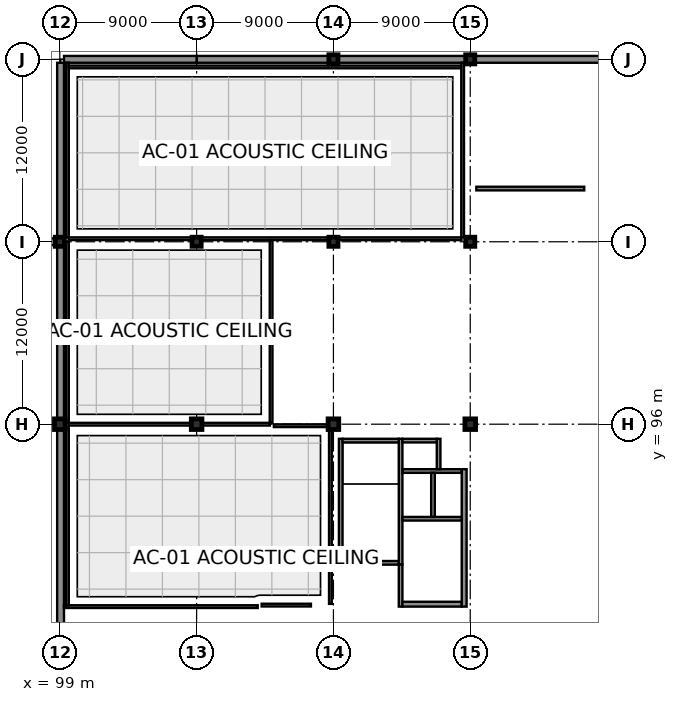
"""IFC4 building model, lengths in metres.
Left out: names, types, materials, properties, quantities, classifications, styles, units other than length and angle.
Written with IfcOpenShell. Run it as: python <this file> out.ifc"""

import sys

from ifc_helpers import new_model, si_unit, direction, frame, frame_2d, origin, origin_2d, place, context, subcontext, project, spatial, rectangle, extrude, element, fill, save


model = new_model("IFC4")
c1 = context("Model", 3, precision=1e-05, world=origin(), true_north=direction((0.0, 1.0)))
c2 = subcontext(c1, "Body", "Model", "MODEL_VIEW")
j1 = project(units=[si_unit("LENGTHUNIT", "METRE"), si_unit("PLANEANGLEUNIT", "RADIAN")], contexts=[c1])
p1 = place(None, origin())
s1 = spatial("IfcSite", under=j1, at=p1, CompositionType="ELEMENT")
p2 = place(p1, origin())
s2 = spatial("IfcBuilding", under=s1, at=p2, CompositionType="ELEMENT")
p3 = place(p2, frame((0.0, 0.0, -4.5)))
s3 = spatial("IfcBuildingStorey", under=s2, at=p3, CompositionType="ELEMENT", Elevation=-4.5)
p4 = place(p3, frame((99.0, 96.0, 0.0), z_axis=(0.0, 0.0, 1.0), x_axis=(1.0, 0.0, 0.0)))
e1 = element("IfcColumn", 1, at=p4, inside=s3, PredefinedType="COLUMN", context=c2, shape_type="SweptSolid", body=[
    extrude(rectangle(XDim=0.7, YDim=0.7, at=origin_2d()), origin(), (0.0, 0.0, 1.0), 4.5),
])
p5 = place(p3, frame((99.0, 108.0, 0.0), z_axis=(0.0, 0.0, 1.0), x_axis=(1.0, 0.0, 0.0)))
e2 = element("IfcColumn", 2, at=p5, inside=s3, PredefinedType="COLUMN", context=c2, shape_type="SweptSolid", body=[
    extrude(rectangle(XDim=0.6, YDim=0.6, at=origin_2d()), origin(), (0.0, 0.0, 1.0), 4.5),
])
p6 = place(p3, frame((108.0, 96.0, 0.0), z_axis=(0.0, 0.0, 1.0), x_axis=(1.0, 0.0, 0.0)))
e3 = element("IfcColumn", 3, at=p6, inside=s3, PredefinedType="COLUMN", context=c2, shape_type="SweptSolid", body=[
    extrude(rectangle(XDim=0.7, YDim=0.7, at=origin_2d()), origin(), (0.0, 0.0, 1.0), 4.5),
])
p7 = place(p3, frame((108.0, 108.0, 0.0), z_axis=(0.0, 0.0, 1.0), x_axis=(1.0, 0.0, 0.0)))
e4 = element("IfcColumn", 4, at=p7, inside=s3, PredefinedType="COLUMN", context=c2, shape_type="SweptSolid", body=[
    extrude(rectangle(XDim=0.6, YDim=0.6, at=origin_2d()), origin(), (0.0, 0.0, 1.0), 4.5),
])
p8 = place(p3, frame((117.0, 96.0, 0.0), z_axis=(0.0, 0.0, 1.0), x_axis=(1.0, 0.0, 0.0)))
e5 = element("IfcColumn", 5, at=p8, inside=s3, PredefinedType="COLUMN", context=c2, shape_type="SweptSolid", body=[
    extrude(rectangle(XDim=0.7, YDim=0.7, at=origin_2d()), origin(), (0.0, 0.0, 1.0), 4.5),
])
for number, where, z_axis, x_axis in (
    (6, (117.0, 108.0, 0.0), (0.0, 0.0, 1.0), (1.0, 0.0, 0.0)),
    (7, (117.0, 120.0, 0.0), (0.0, 0.0, 1.0), (1.0, 0.0, 0.0)),
):
    element("IfcColumn", number, at=place(p3, frame(where, z_axis=z_axis, x_axis=x_axis)), inside=s3, PredefinedType="COLUMN", context=c2, shape_type="SweptSolid", body=[
        extrude(rectangle(XDim=0.6, YDim=0.6, at=origin_2d()), origin(), (0.0, 0.0, 1.0), 4.5),
    ])
p9 = place(p3, frame((126.0, 96.0, 0.0), z_axis=(0.0, 0.0, 1.0), x_axis=(1.0, 0.0, 0.0)))
e8 = element("IfcColumn", 8, at=p9, inside=s3, PredefinedType="COLUMN", context=c2, shape_type="SweptSolid", body=[
    extrude(rectangle(XDim=0.7, YDim=0.7, at=origin_2d()), origin(), (0.0, 0.0, 1.0), 4.5),
])
for number, where, z_axis, x_axis in (
    (9, (126.0, 108.0, 0.0), (0.0, 0.0, 1.0), (1.0, 0.0, 0.0)),
    (10, (126.0, 120.0, 0.0), (0.0, 0.0, 1.0), (1.0, 0.0, 0.0)),
):
    element("IfcColumn", number, at=place(p3, frame(where, z_axis=z_axis, x_axis=x_axis)), inside=s3, PredefinedType="COLUMN", context=c2, shape_type="SweptSolid", body=[
        extrude(rectangle(XDim=0.6, YDim=0.6, at=origin_2d()), origin(), (0.0, 0.0, 1.0), 4.5),
    ])
for number, where, z_axis, x_axis in (
    (11, (134.704, 120.0, 0.0), (0.0, 0.0, 1.0), (-1.0, 0.0, 0.0)),
    (12, (125.704, 120.0, 0.0), (0.0, 0.0, 1.0), (-1.0, 0.0, 0.0)),
):
    element("IfcWall", number, at=place(p3, frame(where, z_axis=z_axis, x_axis=x_axis)), inside=s3, PredefinedType="USERDEFINED", context=c2, shape_type="SweptSolid", body=[
        extrude(rectangle(XDim=8.408, YDim=0.45, at=frame_2d((4.204, 0.0))), origin(), (0.0, 0.0, 1.0), 4.32),
    ])
p10 = place(p3, frame((116.704, 120.0, 0.0), z_axis=(0.0, 0.0, 1.0), x_axis=(-1.0, 0.0, 0.0)))
e13 = element("IfcWall", 13, at=p10, inside=s3, PredefinedType="USERDEFINED", context=c2, shape_type="SweptSolid", body=[
    extrude(rectangle(XDim=8.704, YDim=0.45, at=frame_2d((4.352, 0.0))), origin(), (0.0, 0.0, 1.0), 4.32),
])
p11 = place(p3, frame((108.0, 120.0, 0.0), z_axis=(0.0, 0.0, 1.0), x_axis=(-1.0, 0.0, 0.0)))
e14 = element("IfcWall", 14, at=p11, inside=s3, PredefinedType="USERDEFINED", context=c2, shape_type="SweptSolid", body=[
    extrude(rectangle(XDim=8.725, YDim=0.45, at=frame_2d((4.362, 0.0))), origin(), (0.0, 0.0, 1.0), 4.32),
])
p12 = place(p3, frame((99.05, 119.775, 0.0), z_axis=(0.0, 0.0, 1.0), x_axis=(0.0, -1.0, 0.0)))
e15 = element("IfcWall", 15, at=p12, inside=s3, PredefinedType="USERDEFINED", context=c2, shape_type="SweptSolid", body=[
    extrude(rectangle(XDim=11.479, YDim=0.45, at=frame_2d((5.74, 0.0))), origin(), (0.0, 0.0, 1.0), 4.32),
])
p13 = place(p3, frame((99.05, 107.704, 0.0), z_axis=(0.0, 0.0, 1.0), x_axis=(0.0, -1.0, 0.0)))
e16 = element("IfcWall", 16, at=p13, inside=s3, PredefinedType="USERDEFINED", context=c2, shape_type="SweptSolid", body=[
    extrude(rectangle(XDim=11.358, YDim=0.45, at=frame_2d((5.679, 0.0))), origin(), (0.0, 0.0, 1.0), 4.32),
])
p14 = place(p3, frame((99.05, 95.654, 0.0), z_axis=(0.0, 0.0, 1.0), x_axis=(0.0, -1.0, 0.0)))
e17 = element("IfcWall", 17, at=p14, inside=s3, PredefinedType="USERDEFINED", context=c2, shape_type="SweptSolid", body=[
    extrude(rectangle(XDim=17.308, YDim=0.45, at=frame_2d((8.654, 0.0))), origin(), (0.0, 0.0, 1.0), 4.32),
])
p15 = place(p3, frame((98.654, 108.0, 0.0), z_axis=(0.0, 0.0, 1.0), x_axis=(-1.0, 0.0, 0.0)))
e18 = element("IfcWall", 18, at=p15, inside=s3, PredefinedType="USERDEFINED", context=c2, shape_type="SweptSolid", body=[
    extrude(rectangle(XDim=8.358, YDim=0.45, at=frame_2d((4.179, 0.0))), origin(), (0.0, 0.0, 1.0), 4.32),
])
p16 = place(p3, frame((117.48, 86.76, 0.0), z_axis=(0.0, 0.0, 1.0), x_axis=(0.0, 1.0, 0.0)))
e19 = element("IfcWall", 19, at=p16, inside=s3, PredefinedType="SHEAR", context=c2, shape_type="SweptSolid", body=[
    extrude(rectangle(XDim=8.28, YDim=0.24, at=frame_2d((4.14, 0.0))), origin(), (0.0, 0.0, 1.0), 4.31),
])
p17 = place(p3, frame((121.42, 86.76, 0.0), z_axis=(0.0, 0.0, 1.0), x_axis=(0.0, 1.0, 0.0)))
e20 = element("IfcWall", 20, at=p17, inside=s3, PredefinedType="SHEAR", context=c2, shape_type="SweptSolid", body=[
    extrude(rectangle(XDim=8.28, YDim=0.24, at=frame_2d((4.14, 0.0))), origin(), (0.0, 0.0, 1.0), 4.31),
])
p18 = place(p17, frame((0.54, 0.0, 0.0)))
e21 = element("IfcOpeningElement", 21, at=p18, cuts=e20, PredefinedType="OPENING", context=c2, shape_type="SweptSolid", body=[
    extrude(rectangle(XDim=1.2, YDim=2.15, at=frame_2d((0.6, 1.075))), frame((0.0, 0.135, 0.0), z_axis=(0.0, -1.0, 0.0), x_axis=(1.0, 0.0, 0.0)), (0.0, 0.0, 1.0), 0.27),
])
for number, where, z_axis, x_axis in (
    (22, (117.6, 86.88, 0.0), (0.0, 0.0, 1.0), (1.0, 0.0, 0.0)),
    (23, (117.6, 94.92, 0.0), (0.0, 0.0, 1.0), (1.0, 0.0, 0.0)),
):
    element("IfcWall", number, at=place(p3, frame(where, z_axis=z_axis, x_axis=x_axis)), inside=s3, PredefinedType="SHEAR", context=c2, shape_type="SweptSolid", body=[
        extrude(rectangle(XDim=3.7, YDim=0.24, at=frame_2d((1.85, 0.0))), origin(), (0.0, 0.0, 1.0), 4.31),
    ])
p19 = place(p3, frame((121.42, 84.0, 0.0), z_axis=(0.0, 0.0, 1.0), x_axis=(0.0, 1.0, 0.0)))
e24 = element("IfcWall", 24, at=p19, inside=s3, PredefinedType="SHEAR", context=c2, shape_type="SweptSolid", body=[
    extrude(rectangle(XDim=2.76, YDim=0.24, at=frame_2d((1.38, 0.0))), origin(), (0.0, 0.0, 1.0), 4.16),
])
p20 = place(p3, frame((121.54, 84.16, 0.0), z_axis=(0.0, 0.0, 1.0), x_axis=(1.0, 0.0, 0.0)))
e25 = element("IfcWall", 25, at=p20, inside=s3, PredefinedType="SHEAR", context=c2, shape_type="SweptSolid", body=[
    extrude(rectangle(XDim=3.9, YDim=0.32, at=frame_2d((1.95, 0.0))), origin(), (0.0, 0.0, 1.0), 4.16),
])
p21 = place(p20, frame((1.225, 0.0, 0.0)))
e26 = element("IfcOpeningElement", 26, at=p21, cuts=e25, PredefinedType="OPENING", context=c2, shape_type="SweptSolid", body=[
    extrude(rectangle(XDim=1.45, YDim=2.2, at=frame_2d((0.725, 1.1))), frame((0.0, 0.175, 0.0), z_axis=(0.0, -1.0, 0.0), x_axis=(1.0, 0.0, 0.0)), (0.0, 0.0, 1.0), 0.35),
])
p22 = place(p3, frame((125.6, 84.0, 0.0), z_axis=(0.0, 0.0, 1.0), x_axis=(0.0, 1.0, 0.0)))
e27 = element("IfcWall", 27, at=p22, inside=s3, PredefinedType="SHEAR", context=c2, shape_type="SweptSolid", body=[
    extrude(rectangle(XDim=9.04, YDim=0.32, at=frame_2d((4.52, 0.0))), origin(), (0.0, 0.0, 1.0), 4.16),
])
p23 = place(p3, frame((121.54, 89.78, 0.0), z_axis=(0.0, 0.0, 1.0), x_axis=(1.0, 0.0, 0.0)))
e28 = element("IfcWall", 28, at=p23, inside=s3, PredefinedType="SHEAR", context=c2, shape_type="SweptSolid", body=[
    extrude(rectangle(XDim=3.9, YDim=0.24, at=frame_2d((1.95, 0.0))), origin(), (0.0, 0.0, 1.0), 4.31),
])
p24 = place(p23, frame((0.385, 0.0, 0.0)))
e29 = element("IfcOpeningElement", 29, at=p24, cuts=e28, PredefinedType="OPENING", context=c2, shape_type="SweptSolid", body=[
    extrude(rectangle(XDim=1.3, YDim=2.2, at=frame_2d((0.65, 1.1))), frame((0.0, 0.135, 0.0), z_axis=(0.0, -1.0, 0.0), x_axis=(1.0, 0.0, 0.0)), (0.0, 0.0, 1.0), 0.27),
])
p25 = place(p23, frame((2.335, 0.0, 0.0)))
e30 = element("IfcOpeningElement", 30, at=p25, cuts=e28, PredefinedType="OPENING", context=c2, shape_type="SweptSolid", body=[
    extrude(rectangle(XDim=1.3, YDim=2.2, at=frame_2d((0.65, 1.1))), frame((0.0, 0.135, 0.0), z_axis=(0.0, -1.0, 0.0), x_axis=(1.0, 0.0, 0.0)), (0.0, 0.0, 1.0), 0.27),
])
p26 = place(p3, frame((121.54, 92.92, 0.0), z_axis=(0.0, 0.0, 1.0), x_axis=(1.0, 0.0, 0.0)))
e31 = element("IfcWall", 31, at=p26, inside=s3, PredefinedType="SHEAR", context=c2, shape_type="SweptSolid", body=[
    extrude(rectangle(XDim=3.9, YDim=0.24, at=frame_2d((1.95, 0.0))), origin(), (0.0, 0.0, 1.0), 4.31),
])
p27 = place(p3, frame((123.55, 89.9, 0.0), z_axis=(0.0, 0.0, 1.0), x_axis=(0.0, 1.0, 0.0)))
e32 = element("IfcWall", 32, at=p27, inside=s3, PredefinedType="SHEAR", context=c2, shape_type="SweptSolid", body=[
    extrude(rectangle(XDim=2.9, YDim=0.24, at=frame_2d((1.45, 0.0))), origin(), (0.0, 0.0, 1.0), 4.31),
])
p28 = place(p3, frame((123.92, 93.04, 0.0), z_axis=(0.0, 0.0, 1.0), x_axis=(0.0, 1.0, 0.0)))
e33 = element("IfcWall", 33, at=p28, inside=s3, PredefinedType="SHEAR", context=c2, shape_type="SweptSolid", body=[
    extrude(rectangle(XDim=2.0, YDim=0.24, at=frame_2d((1.0, 0.0))), origin(), (0.0, 0.0, 1.0), 4.31),
])
p29 = place(p3, frame((121.54, 94.92, 0.0), z_axis=(0.0, 0.0, 1.0), x_axis=(1.0, 0.0, 0.0)))
e34 = element("IfcWall", 34, at=p29, inside=s3, PredefinedType="SHEAR", context=c2, shape_type="SweptSolid", body=[
    extrude(rectangle(XDim=2.26, YDim=0.24, at=frame_2d((1.13, 0.0))), origin(), (0.0, 0.0, 1.0), 4.31),
])
p30 = place(p3, frame((126.4, 111.5, 0.0), z_axis=(0.0, 0.0, 1.0), x_axis=(1.0, 0.0, 0.0)))
e35 = element("IfcWall", 35, at=p30, inside=s3, PredefinedType="SHEAR", context=c2, shape_type="SweptSolid", body=[
    extrude(rectangle(XDim=7.1, YDim=0.24, at=frame_2d((3.55, 0.0))), origin(), (0.0, 0.0, 1.0), 3.64),
])
p31 = place(p30, frame((1.75, 0.0, 0.0)))
e36 = element("IfcOpeningElement", 36, at=p31, cuts=e35, PredefinedType="OPENING", context=c2, shape_type="SweptSolid", body=[
    extrude(rectangle(XDim=3.6, YDim=2.6, at=frame_2d((1.8, 1.3))), frame((0.0, 0.135, 0.0), z_axis=(0.0, -1.0, 0.0), x_axis=(1.0, 0.0, 0.0)), (0.0, 0.0, 1.0), 0.27),
])
p32 = place(p3, frame((99.5, 108.28, 0.0), z_axis=(0.0, 0.0, 1.0), x_axis=(0.0, 1.0, 0.0)))
e37 = element("IfcWall", 37, at=p32, inside=s3, PredefinedType="PARTITIONING", context=c2, shape_type="SweptSolid", body=[
    extrude(rectangle(XDim=11.5, YDim=0.18, at=frame_2d((5.75, 0.0))), origin(), (0.0, 0.0, 1.0), 4.14),
])
p33 = place(p3, frame((99.58, 119.5, 0.0), z_axis=(0.0, 0.0, 1.0), x_axis=(1.0, 0.0, 0.0)))
e38 = element("IfcWall", 38, at=p33, inside=s3, PredefinedType="PARTITIONING", context=c2, shape_type="SweptSolid", body=[
    extrude(rectangle(XDim=25.84, YDim=0.18, at=frame_2d((12.92, 0.0))), origin(), (0.0, 0.0, 1.0), 4.14),
])
p34 = place(p3, frame((125.5, 119.78, 0.0), z_axis=(0.0, 0.0, 1.0), x_axis=(0.0, -1.0, 0.0)))
e39 = element("IfcWall", 39, at=p34, inside=s3, PredefinedType="PARTITIONING", context=c2, shape_type="SweptSolid", body=[
    extrude(rectangle(XDim=11.5, YDim=0.18, at=frame_2d((5.75, 0.0))), origin(), (0.0, 0.0, 1.0), 4.14),
])
p35 = place(p3, frame((125.42, 108.2, 0.0), z_axis=(0.0, 0.0, 1.0), x_axis=(-1.0, 0.0, 0.0)))
e40 = element("IfcWall", 40, at=p35, inside=s3, PredefinedType="PARTITIONING", context=c2, shape_type="SweptSolid", body=[
    extrude(rectangle(XDim=25.84, YDim=0.18, at=frame_2d((12.92, 0.0))), origin(), (0.0, 0.0, 1.0), 3.645),
])
p36 = place(p35, frame((9.945, 0.0, 0.0)))
e41 = element("IfcOpeningElement", 41, at=p36, cuts=e40, PredefinedType="OPENING", context=c2, shape_type="SweptSolid", body=[
    extrude(rectangle(XDim=1.15, YDim=2.15, at=frame_2d((0.575, 1.075))), frame((0.0, 0.105, 0.0), z_axis=(0.0, -1.0, 0.0), x_axis=(1.0, 0.0, 0.0)), (0.0, 0.0, 1.0), 0.21),
])
p37 = place(p35, frame((23.19, 0.0, 1.05)))
e42 = element("IfcOpeningElement", 42, at=p37, cuts=e40, PredefinedType="OPENING", context=c2, shape_type="SweptSolid", body=[
    extrude(rectangle(XDim=1.8, YDim=1.1, at=frame_2d((0.9, 0.55))), frame((0.0, 0.105, 0.0), z_axis=(0.0, -1.0, 0.0), x_axis=(1.0, 0.0, 0.0)), (0.0, 0.0, 1.0), 0.21),
])
p38 = place(p3, frame((112.9, 108.115, 0.0), z_axis=(0.0, 0.0, 1.0), x_axis=(0.0, -1.0, 0.0)))
e43 = element("IfcWall", 43, at=p38, inside=s3, PredefinedType="PARTITIONING", context=c2, shape_type="SweptSolid", body=[
    extrude(rectangle(XDim=12.035, YDim=0.18, at=frame_2d((6.018, 0.0))), origin(), (0.0, 0.0, 1.0), 4.14),
])
p39 = place(p38, frame((5.542, 0.0, 0.0)))
e44 = element("IfcOpeningElement", 44, at=p39, cuts=e43, PredefinedType="OPENING", context=c2, shape_type="SweptSolid", body=[
    extrude(rectangle(XDim=0.95, YDim=2.1, at=frame_2d((0.475, 1.05))), frame((0.0, 0.105, 0.0), z_axis=(0.0, -1.0, 0.0), x_axis=(1.0, 0.0, 0.0)), (0.0, 0.0, 1.0), 0.21),
])
p40 = place(p38, frame((9.685, 0.0, 1.05)))
e45 = element("IfcOpeningElement", 45, at=p40, cuts=e43, PredefinedType="OPENING", context=c2, shape_type="SweptSolid", body=[
    extrude(rectangle(XDim=1.5, YDim=1.1, at=frame_2d((0.75, 0.55))), frame((0.0, 0.105, 0.0), z_axis=(0.0, -1.0, 0.0), x_axis=(1.0, 0.0, 0.0)), (0.0, 0.0, 1.0), 0.21),
])
p41 = place(p3, frame((112.82, 96.0, 0.0), z_axis=(0.0, 0.0, 1.0), x_axis=(-1.0, 0.0, 0.0)))
e46 = element("IfcWall", 46, at=p41, inside=s3, PredefinedType="PARTITIONING", context=c2, shape_type="SweptSolid", body=[
    extrude(rectangle(XDim=13.24, YDim=0.18, at=frame_2d((6.62, 0.0))), origin(), (0.0, 0.0, 1.0), 3.755),
])
p42 = place(p3, frame((99.5, 96.08, 0.0), z_axis=(0.0, 0.0, 1.0), x_axis=(0.0, 1.0, 0.0)))
e47 = element("IfcWall", 47, at=p42, inside=s3, PredefinedType="PARTITIONING", context=c2, shape_type="SweptSolid", body=[
    extrude(rectangle(XDim=11.94, YDim=0.18, at=frame_2d((5.97, 0.0))), origin(), (0.0, 0.0, 1.0), 3.835),
])
p43 = place(p3, frame((115.52, 84.1, 0.0), z_axis=(0.0, 0.0, 1.0), x_axis=(-1.0, 0.0, 0.0)))
e48 = element("IfcWall", 48, at=p43, inside=s3, PredefinedType="PARTITIONING", context=c2, shape_type="SweptSolid", body=[
    extrude(rectangle(XDim=3.24, YDim=0.18, at=frame_2d((1.62, 0.0))), origin(), (0.0, 0.0, 1.0), 4.14),
])
p44 = place(p3, frame((112.02, 84.0, 0.0), z_axis=(0.0, 0.0, 1.0), x_axis=(-1.0, 0.0, 0.0)))
e49 = element("IfcWall", 49, at=p44, inside=s3, PredefinedType="PARTITIONING", context=c2, shape_type="SweptSolid", body=[
    extrude(rectangle(XDim=12.75, YDim=0.18, at=frame_2d((6.375, 0.0))), origin(), (0.0, 0.0, 1.0), 4.14),
])
p45 = place(p3, frame((99.5, 84.08, 0.0), z_axis=(0.0, 0.0, 1.0), x_axis=(0.0, 1.0, 0.0)))
e50 = element("IfcWall", 50, at=p45, inside=s3, PredefinedType="PARTITIONING", context=c2, shape_type="SweptSolid", body=[
    extrude(rectangle(XDim=11.74, YDim=0.18, at=frame_2d((5.87, 0.0))), origin(), (0.0, 0.0, 1.0), 3.715),
])
p46 = place(p3, frame((113.08, 95.9, 0.0), z_axis=(0.0, 0.0, 1.0), x_axis=(1.0, 0.0, 0.0)))
e51 = element("IfcWall", 51, at=p46, inside=s3, PredefinedType="PARTITIONING", context=c2, shape_type="SweptSolid", body=[
    extrude(rectangle(XDim=3.64, YDim=0.18, at=frame_2d((1.82, 0.0))), origin(), (0.0, 0.0, 1.0), 3.755),
])
p47 = place(p46, frame((1.095, 0.0, 0.0)))
e52 = element("IfcOpeningElement", 52, at=p47, cuts=e51, PredefinedType="OPENING", context=c2, shape_type="SweptSolid", body=[
    extrude(rectangle(XDim=1.45, YDim=2.3, at=frame_2d((0.725, 1.15))), frame((0.0, 0.105, 0.0), z_axis=(0.0, -1.0, 0.0), x_axis=(1.0, 0.0, 0.0)), (0.0, 0.0, 1.0), 0.21),
])
p48 = place(p3, frame((116.8, 95.82, 0.0), z_axis=(0.0, 0.0, 1.0), x_axis=(0.0, -1.0, 0.0)))
e53 = element("IfcWall", 53, at=p48, inside=s3, PredefinedType="PARTITIONING", context=c2, shape_type="SweptSolid", body=[
    extrude(rectangle(XDim=11.64, YDim=0.18, at=frame_2d((5.82, 0.0))), origin(), (0.0, 0.0, 1.0), 3.405),
])
p49 = place(p18, frame((1.2, 0.0, 0.0), z_axis=(0.0, 0.0, 1.0), x_axis=(-1.0, 0.0, 0.0)))
e54 = element("IfcDoor", 54, at=p49, inside=s3, OperationType="SINGLE_SWING_LEFT", PredefinedType="DOOR", context=c2, shape_type="SweptSolid", body=[
    extrude(rectangle(XDim=1.2, YDim=2.15, at=frame_2d((0.6, 1.075))), frame((0.0, 0.025, 0.0), z_axis=(0.0, -1.0, 0.0), x_axis=(1.0, 0.0, 0.0)), (0.0, 0.0, 1.0), 0.05),
])
fill(e21, e54)
p50 = place(p21, origin())
e55 = element("IfcDoor", 55, at=p50, inside=s3, OperationType="DOUBLE_DOOR_SINGLE_SWING", PredefinedType="DOOR", context=c2, shape_type="SweptSolid", body=[
    extrude(rectangle(XDim=1.45, YDim=2.2, at=frame_2d((0.725, 1.1))), frame((0.0, 0.025, 0.0), z_axis=(0.0, -1.0, 0.0), x_axis=(1.0, 0.0, 0.0)), (0.0, 0.0, 1.0), 0.05),
])
fill(e26, e55)
p51 = place(p24, origin())
e56 = element("IfcDoor", 56, at=p51, inside=s3, OperationType="DOUBLE_DOOR_SLIDING", PredefinedType="DOOR", context=c2, shape_type="SweptSolid", body=[
    extrude(rectangle(XDim=1.3, YDim=2.2, at=frame_2d((0.65, 1.1))), frame((0.0, 0.025, 0.0), z_axis=(0.0, -1.0, 0.0), x_axis=(1.0, 0.0, 0.0)), (0.0, 0.0, 1.0), 0.05),
])
fill(e29, e56)
p52 = place(p25, origin())
e57 = element("IfcDoor", 57, at=p52, inside=s3, OperationType="DOUBLE_DOOR_SLIDING", PredefinedType="DOOR", context=c2, shape_type="SweptSolid", body=[
    extrude(rectangle(XDim=1.3, YDim=2.2, at=frame_2d((0.65, 1.1))), frame((0.0, 0.025, 0.0), z_axis=(0.0, -1.0, 0.0), x_axis=(1.0, 0.0, 0.0)), (0.0, 0.0, 1.0), 0.05),
])
fill(e30, e57)
p53 = place(p31, frame((3.6, 0.0, 0.0), z_axis=(0.0, 0.0, 1.0), x_axis=(-1.0, 0.0, 0.0)))
e58 = element("IfcDoor", 58, at=p53, inside=s3, OperationType="ROLLINGUP", PredefinedType="GATE", context=c2, shape_type="SweptSolid", body=[
    extrude(rectangle(XDim=3.6, YDim=2.6, at=frame_2d((1.8, 1.3))), frame((0.0, 0.025, 0.0), z_axis=(0.0, -1.0, 0.0), x_axis=(1.0, 0.0, 0.0)), (0.0, 0.0, 1.0), 0.05),
])
fill(e36, e58)
p54 = place(p36, frame((1.15, 0.0, 0.0), z_axis=(0.0, 0.0, 1.0), x_axis=(-1.0, 0.0, 0.0)))
e59 = element("IfcDoor", 59, at=p54, inside=s3, OperationType="SINGLE_SWING_RIGHT", PredefinedType="DOOR", context=c2, shape_type="SweptSolid", body=[
    extrude(rectangle(XDim=1.15, YDim=2.15, at=frame_2d((0.575, 1.075))), frame((0.0, 0.025, 0.0), z_axis=(0.0, -1.0, 0.0), x_axis=(1.0, 0.0, 0.0)), (0.0, 0.0, 1.0), 0.05),
])
fill(e41, e59)
p55 = place(p37, origin())
e60 = element("IfcWindow", 60, at=p55, inside=s3, PartitioningType="SINGLE_PANEL", PredefinedType="WINDOW", context=c2, shape_type="SweptSolid", body=[
    extrude(rectangle(XDim=1.8, YDim=1.1, at=frame_2d((0.9, 0.55))), frame((0.0, 0.03, 0.0), z_axis=(0.0, -1.0, 0.0), x_axis=(1.0, 0.0, 0.0)), (0.0, 0.0, 1.0), 0.06),
])
fill(e42, e60)
p56 = place(p39, origin())
e61 = element("IfcDoor", 61, at=p56, inside=s3, OperationType="SINGLE_SWING_LEFT", PredefinedType="DOOR", context=c2, shape_type="SweptSolid", body=[
    extrude(rectangle(XDim=0.95, YDim=2.1, at=frame_2d((0.475, 1.05))), frame((0.0, 0.025, 0.0), z_axis=(0.0, -1.0, 0.0), x_axis=(1.0, 0.0, 0.0)), (0.0, 0.0, 1.0), 0.05),
])
fill(e44, e61)
p57 = place(p40, origin())
e62 = element("IfcWindow", 62, at=p57, inside=s3, PartitioningType="SINGLE_PANEL", PredefinedType="WINDOW", context=c2, shape_type="SweptSolid", body=[
    extrude(rectangle(XDim=1.5, YDim=1.1, at=frame_2d((0.75, 0.55))), frame((0.0, 0.03, 0.0), z_axis=(0.0, -1.0, 0.0), x_axis=(1.0, 0.0, 0.0)), (0.0, 0.0, 1.0), 0.06),
])
fill(e45, e62)
p58 = place(p47, frame((1.45, 0.0, 0.0), z_axis=(0.0, 0.0, 1.0), x_axis=(-1.0, 0.0, 0.0)))
e63 = element("IfcDoor", 63, at=p58, inside=s3, OperationType="DOUBLE_DOOR_SINGLE_SWING", PredefinedType="DOOR", context=c2, shape_type="SweptSolid", body=[
    extrude(rectangle(XDim=1.45, YDim=2.3, at=frame_2d((0.725, 1.15))), frame((0.0, 0.025, 0.0), z_axis=(0.0, -1.0, 0.0), x_axis=(1.0, 0.0, 0.0)), (0.0, 0.0, 1.0), 0.05),
])
fill(e52, e63)
save(model, sys.argv[1])
